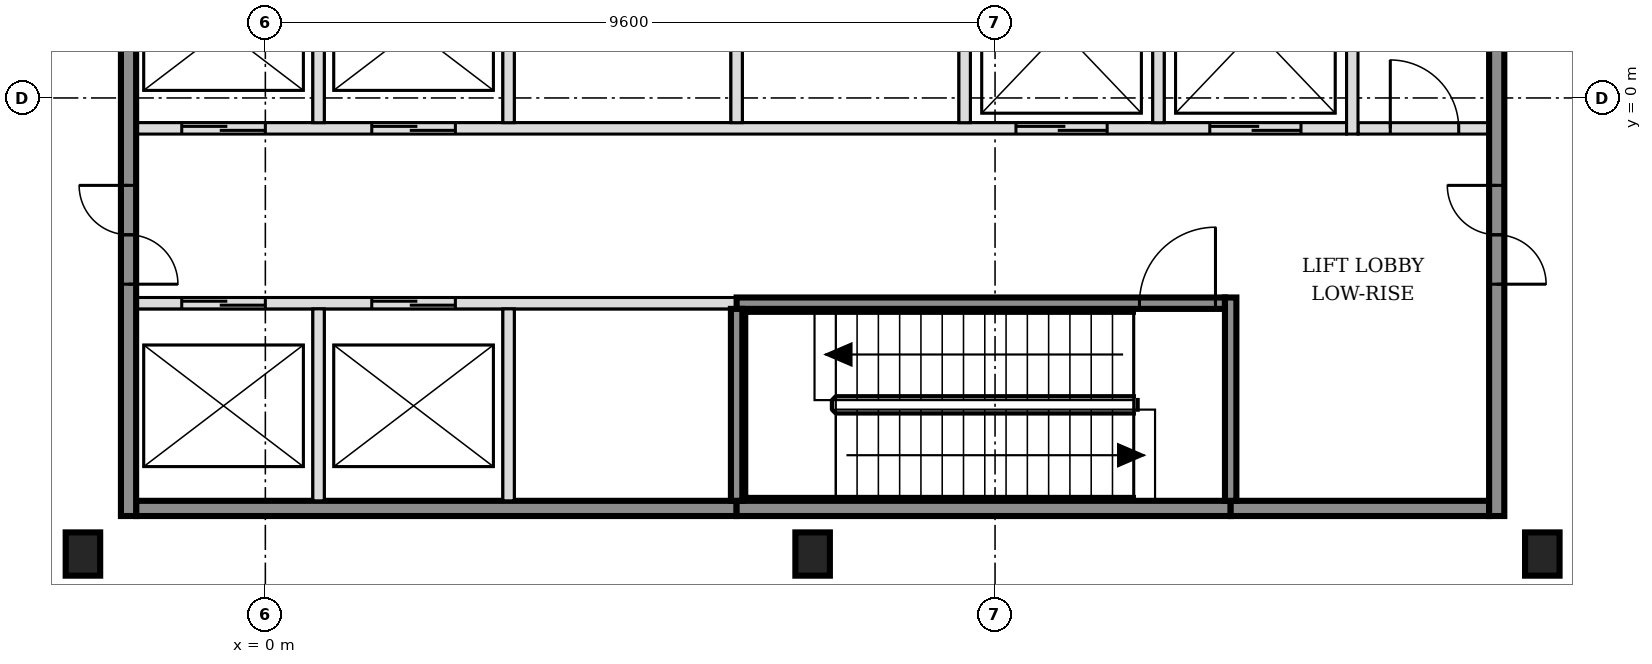
"""IFC4 building model, lengths in metres.
Left out: names, types, materials, properties, quantities, classifications, styles, units other than length and angle.
Written with IfcOpenShell. Run it as: python <this file> out.ifc"""

import sys

from ifc_helpers import new_model, si_unit, direction, frame, frame_2d, origin, origin_2d, place, context, subcontext, project, spatial, rectangle, i_section, extrude, element, fill, save


model = new_model("IFC4")
c1 = context("Model", 3, precision=1e-05, world=origin(), true_north=direction((0.0, 1.0)))
c2 = subcontext(c1, "Body", "Model", "MODEL_VIEW")
j1 = project(units=[si_unit("LENGTHUNIT", "METRE"), si_unit("PLANEANGLEUNIT", "RADIAN")], contexts=[c1])
p1 = place(None, origin())
s1 = spatial("IfcSite", under=j1, at=p1, CompositionType="ELEMENT")
p2 = place(p1, origin())
s2 = spatial("IfcBuilding", under=s1, at=p2, CompositionType="ELEMENT")
p3 = place(p2, frame((0.0, 0.0, 30.6)))
s3 = spatial("IfcBuildingStorey", under=s2, at=p3, CompositionType="ELEMENT", Elevation=30.6)
for number, where, z_axis, x_axis in (
    (1, (-2.4, -6.0, -0.2), (0.0, 0.0, 1.0), (1.0, 0.0, 0.0)),
    (2, (7.2, -6.0, -0.2), (0.0, 0.0, 1.0), (1.0, 0.0, 0.0)),
    (3, (16.8, -6.0, -0.2), (0.0, 0.0, 1.0), (1.0, 0.0, 0.0)),
):
    element("IfcColumn", number, at=place(p3, frame(where, z_axis=z_axis, x_axis=x_axis)), inside=s3, PredefinedType="COLUMN", context=c2, shape_type="SweptSolid", body=[
        extrude(i_section(OverallWidth=0.454, OverallDepth=0.569, WebThickness=0.078, FlangeThickness=0.125, FilletRadius=0.015, at=origin_2d()), origin(), (0.0, 0.0, 1.0), 4.8),
    ])
p4 = place(p3, frame((-1.7, -5.4, 0.0), z_axis=(0.0, 0.0, 1.0), x_axis=(1.0, 0.0, 0.0)))
e4 = element("IfcWall", 4, at=p4, inside=s3, PredefinedType="SOLIDWALL", context=c2, shape_type="SweptSolid", body=[
    extrude(rectangle(XDim=7.9, YDim=0.2, at=frame_2d((3.95, 0.0))), origin(), (0.0, 0.0, 1.0), 4.6),
])
p5 = place(p3, frame((6.2, -5.4, 0.0), z_axis=(0.0, 0.0, 1.0), x_axis=(1.0, 0.0, 0.0)))
e5 = element("IfcWall", 5, at=p5, inside=s3, PredefinedType="SOLIDWALL", context=c2, shape_type="SweptSolid", body=[
    extrude(rectangle(XDim=6.5, YDim=0.2, at=frame_2d((3.25, 0.0))), origin(), (0.0, 0.0, 1.0), 4.6),
])
p6 = place(p3, frame((12.7, -5.4, 0.0), z_axis=(0.0, 0.0, 1.0), x_axis=(1.0, 0.0, 0.0)))
e6 = element("IfcWall", 6, at=p6, inside=s3, PredefinedType="SOLIDWALL", context=c2, shape_type="SweptSolid", body=[
    extrude(rectangle(XDim=3.4, YDim=0.2, at=frame_2d((1.7, 0.0))), origin(), (0.0, 0.0, 1.0), 4.6),
])
p7 = place(p3, frame((-1.7, -2.7, 0.0), z_axis=(0.0, 0.0, 1.0), x_axis=(1.0, 0.0, 0.0)))
e7 = element("IfcWall", 7, at=p7, inside=s3, PredefinedType="SOLIDWALL", context=c2, shape_type="SweptSolid", body=[
    extrude(rectangle(XDim=7.9, YDim=0.15, at=frame_2d((3.95, 0.0))), origin(), (0.0, 0.0, 1.0), 4.6),
])
p8 = place(p7, frame((0.6, 0.0, 0.0)))
e8 = element("IfcOpeningElement", 8, at=p8, cuts=e7, PredefinedType="OPENING", context=c2, shape_type="SweptSolid", body=[
    extrude(rectangle(XDim=1.1, YDim=2.1, at=frame_2d((0.55, 1.05))), frame((0.0, 0.085, 0.0), z_axis=(0.0, -1.0, 0.0), x_axis=(1.0, 0.0, 0.0)), (0.0, 0.0, 1.0), 0.17),
])
p9 = place(p7, frame((3.1, 0.0, 0.0)))
e9 = element("IfcOpeningElement", 9, at=p9, cuts=e7, PredefinedType="OPENING", context=c2, shape_type="SweptSolid", body=[
    extrude(rectangle(XDim=1.1, YDim=2.1, at=frame_2d((0.55, 1.05))), frame((0.0, 0.085, 0.0), z_axis=(0.0, -1.0, 0.0), x_axis=(1.0, 0.0, 0.0)), (0.0, 0.0, 1.0), 0.17),
])
p10 = place(p3, frame((6.2, -2.7, 0.0), z_axis=(0.0, 0.0, 1.0), x_axis=(1.0, 0.0, 0.0)))
e10 = element("IfcWall", 10, at=p10, inside=s3, PredefinedType="SOLIDWALL", context=c2, shape_type="SweptSolid", body=[
    extrude(rectangle(XDim=6.425, YDim=0.15, at=frame_2d((3.212, 0.0))), origin(), (0.0, 0.0, 1.0), 4.6),
])
p11 = place(p10, frame((5.3, 0.0, 0.0)))
e11 = element("IfcOpeningElement", 11, at=p11, cuts=e10, PredefinedType="OPENING", context=c2, shape_type="SweptSolid", body=[
    extrude(rectangle(XDim=1.0, YDim=2.1, at=frame_2d((0.5, 1.05))), frame((0.0, 0.085, 0.0), z_axis=(0.0, -1.0, 0.0), x_axis=(1.0, 0.0, 0.0)), (0.0, 0.0, 1.0), 0.17),
])
p12 = place(p3, frame((-1.7, -0.4, 0.0), z_axis=(0.0, 0.0, 1.0), x_axis=(1.0, 0.0, 0.0)))
e12 = element("IfcWall", 12, at=p12, inside=s3, PredefinedType="SOLIDWALL", context=c2, shape_type="SweptSolid", body=[
    extrude(rectangle(XDim=15.925, YDim=0.15, at=frame_2d((7.962, 0.0))), origin(), (0.0, 0.0, 1.0), 4.6),
])
p13 = place(p12, frame((0.6, 0.0, 0.0)))
e13 = element("IfcOpeningElement", 13, at=p13, cuts=e12, PredefinedType="OPENING", context=c2, shape_type="SweptSolid", body=[
    extrude(rectangle(XDim=1.1, YDim=2.1, at=frame_2d((0.55, 1.05))), frame((0.0, 0.085, 0.0), z_axis=(0.0, -1.0, 0.0), x_axis=(1.0, 0.0, 0.0)), (0.0, 0.0, 1.0), 0.17),
])
p14 = place(p12, frame((3.1, 0.0, 0.0)))
e14 = element("IfcOpeningElement", 14, at=p14, cuts=e12, PredefinedType="OPENING", context=c2, shape_type="SweptSolid", body=[
    extrude(rectangle(XDim=1.1, YDim=2.1, at=frame_2d((0.55, 1.05))), frame((0.0, 0.085, 0.0), z_axis=(0.0, -1.0, 0.0), x_axis=(1.0, 0.0, 0.0)), (0.0, 0.0, 1.0), 0.17),
])
p15 = place(p12, frame((11.575, 0.0, 0.0)))
e15 = element("IfcOpeningElement", 15, at=p15, cuts=e12, PredefinedType="OPENING", context=c2, shape_type="SweptSolid", body=[
    extrude(rectangle(XDim=1.2, YDim=2.1, at=frame_2d((0.6, 1.05))), frame((0.0, 0.085, 0.0), z_axis=(0.0, -1.0, 0.0), x_axis=(1.0, 0.0, 0.0)), (0.0, 0.0, 1.0), 0.17),
])
p16 = place(p12, frame((14.125, 0.0, 0.0)))
e16 = element("IfcOpeningElement", 16, at=p16, cuts=e12, PredefinedType="OPENING", context=c2, shape_type="SweptSolid", body=[
    extrude(rectangle(XDim=1.2, YDim=2.1, at=frame_2d((0.6, 1.05))), frame((0.0, 0.085, 0.0), z_axis=(0.0, -1.0, 0.0), x_axis=(1.0, 0.0, 0.0)), (0.0, 0.0, 1.0), 0.17),
])
p17 = place(p3, frame((14.375, -0.4, 0.0), z_axis=(0.0, 0.0, 1.0), x_axis=(1.0, 0.0, 0.0)))
e17 = element("IfcWall", 17, at=p17, inside=s3, PredefinedType="PARTITIONING", context=c2, shape_type="SweptSolid", body=[
    extrude(rectangle(XDim=1.725, YDim=0.15, at=frame_2d((0.863, 0.0))), origin(), (0.0, 0.0, 1.0), 4.6),
])
p18 = place(p17, frame((0.425, 0.0, 0.0)))
e18 = element("IfcOpeningElement", 18, at=p18, cuts=e17, PredefinedType="OPENING", context=c2, shape_type="SweptSolid", body=[
    extrude(rectangle(XDim=0.9, YDim=2.1, at=frame_2d((0.45, 1.05))), frame((0.0, 0.085, 0.0), z_axis=(0.0, -1.0, 0.0), x_axis=(1.0, 0.0, 0.0)), (0.0, 0.0, 1.0), 0.17),
])
p19 = place(p3, frame((-1.8, -5.5, 0.0), z_axis=(0.0, 0.0, 1.0), x_axis=(0.0, 1.0, 0.0)))
e19 = element("IfcWall", 19, at=p19, inside=s3, PredefinedType="SOLIDWALL", context=c2, shape_type="SweptSolid", body=[
    extrude(rectangle(XDim=15.8, YDim=0.2, at=frame_2d((7.9, 0.0))), origin(), (0.0, 0.0, 1.0), 4.6),
])
p20 = place(p19, frame((3.05, 0.0, 0.0)))
e20 = element("IfcOpeningElement", 20, at=p20, cuts=e19, PredefinedType="OPENING", context=c2, shape_type="SweptSolid", body=[
    extrude(rectangle(XDim=1.3, YDim=2.1, at=frame_2d((0.65, 1.05))), frame((0.0, 0.11, 0.0), z_axis=(0.0, -1.0, 0.0), x_axis=(1.0, 0.0, 0.0)), (0.0, 0.0, 1.0), 0.22),
])
p21 = place(p19, frame((11.45, 0.0, 0.0)))
e21 = element("IfcOpeningElement", 21, at=p21, cuts=e19, PredefinedType="OPENING", context=c2, shape_type="SweptSolid", body=[
    extrude(rectangle(XDim=1.3, YDim=2.1, at=frame_2d((0.65, 1.05))), frame((0.0, 0.11, 0.0), z_axis=(0.0, -1.0, 0.0), x_axis=(1.0, 0.0, 0.0)), (0.0, 0.0, 1.0), 0.22),
])
p22 = place(p3, frame((0.7, -5.3, 0.0), z_axis=(0.0, 0.0, 1.0), x_axis=(0.0, 1.0, 0.0)))
e22 = element("IfcWall", 22, at=p22, inside=s3, PredefinedType="SOLIDWALL", context=c2, shape_type="SweptSolid", body=[
    extrude(rectangle(XDim=2.525, YDim=0.15, at=frame_2d((1.263, 0.0))), origin(), (0.0, 0.0, 1.0), 4.6),
])
p23 = place(p3, frame((0.7, -0.325, 0.0), z_axis=(0.0, 0.0, 1.0), x_axis=(0.0, 1.0, 0.0)))
e23 = element("IfcWall", 23, at=p23, inside=s3, PredefinedType="SOLIDWALL", context=c2, shape_type="SweptSolid", body=[
    extrude(rectangle(XDim=2.45, YDim=0.15, at=frame_2d((1.225, 0.0))), origin(), (0.0, 0.0, 1.0), 4.6),
])
p24 = place(p3, frame((3.2, -5.3, 0.0), z_axis=(0.0, 0.0, 1.0), x_axis=(0.0, 1.0, 0.0)))
e24 = element("IfcWall", 24, at=p24, inside=s3, PredefinedType="SOLIDWALL", context=c2, shape_type="SweptSolid", body=[
    extrude(rectangle(XDim=2.525, YDim=0.15, at=frame_2d((1.263, 0.0))), origin(), (0.0, 0.0, 1.0), 4.6),
])
p25 = place(p3, frame((3.2, -0.325, 0.0), z_axis=(0.0, 0.0, 1.0), x_axis=(0.0, 1.0, 0.0)))
e25 = element("IfcWall", 25, at=p25, inside=s3, PredefinedType="SOLIDWALL", context=c2, shape_type="SweptSolid", body=[
    extrude(rectangle(XDim=2.45, YDim=0.15, at=frame_2d((1.225, 0.0))), origin(), (0.0, 0.0, 1.0), 4.6),
])
p26 = place(p3, frame((6.2, -5.3, 0.0), z_axis=(0.0, 0.0, 1.0), x_axis=(0.0, 1.0, 0.0)))
e26 = element("IfcWall", 26, at=p26, inside=s3, PredefinedType="SOLIDWALL", context=c2, shape_type="SweptSolid", body=[
    extrude(rectangle(XDim=2.525, YDim=0.15, at=frame_2d((1.263, 0.0))), origin(), (0.0, 0.0, 1.0), 4.6),
])
for number, where, z_axis, x_axis in (
    (27, (6.2, -0.325, 0.0), (0.0, 0.0, 1.0), (0.0, 1.0, 0.0)),
    (28, (9.2, -0.325, 0.0), (0.0, 0.0, 1.0), (0.0, 1.0, 0.0)),
    (29, (11.75, -0.325, 0.0), (0.0, 0.0, 1.0), (0.0, 1.0, 0.0)),
):
    element("IfcWall", number, at=place(p3, frame(where, z_axis=z_axis, x_axis=x_axis)), inside=s3, PredefinedType="SOLIDWALL", context=c2, shape_type="SweptSolid", body=[
        extrude(rectangle(XDim=2.45, YDim=0.15, at=frame_2d((1.225, 0.0))), origin(), (0.0, 0.0, 1.0), 4.6),
    ])
p27 = place(p3, frame((12.7, -5.3, 0.0), z_axis=(0.0, 0.0, 1.0), x_axis=(0.0, 1.0, 0.0)))
e30 = element("IfcWall", 30, at=p27, inside=s3, PredefinedType="SOLIDWALL", context=c2, shape_type="SweptSolid", body=[
    extrude(rectangle(XDim=2.675, YDim=0.15, at=frame_2d((1.337, 0.0))), origin(), (0.0, 0.0, 1.0), 4.6),
])
p28 = place(p3, frame((14.3, -0.475, 0.0), z_axis=(0.0, 0.0, 1.0), x_axis=(0.0, 1.0, 0.0)))
e31 = element("IfcWall", 31, at=p28, inside=s3, PredefinedType="SOLIDWALL", context=c2, shape_type="SweptSolid", body=[
    extrude(rectangle(XDim=2.75, YDim=0.15, at=frame_2d((1.375, 0.0))), origin(), (0.0, 0.0, 1.0), 4.6),
])
p29 = place(p3, frame((16.2, -5.5, 0.0), z_axis=(0.0, 0.0, 1.0), x_axis=(0.0, 1.0, 0.0)))
e32 = element("IfcWall", 32, at=p29, inside=s3, PredefinedType="SOLIDWALL", context=c2, shape_type="SweptSolid", body=[
    extrude(rectangle(XDim=15.8, YDim=0.2, at=frame_2d((7.9, 0.0))), origin(), (0.0, 0.0, 1.0), 4.6),
])
p30 = place(p29, frame((3.05, 0.0, 0.0)))
e33 = element("IfcOpeningElement", 33, at=p30, cuts=e32, PredefinedType="OPENING", context=c2, shape_type="SweptSolid", body=[
    extrude(rectangle(XDim=1.3, YDim=2.1, at=frame_2d((0.65, 1.05))), frame((0.0, 0.11, 0.0), z_axis=(0.0, -1.0, 0.0), x_axis=(1.0, 0.0, 0.0)), (0.0, 0.0, 1.0), 0.22),
])
p31 = place(p29, frame((11.45, 0.0, 0.0)))
e34 = element("IfcOpeningElement", 34, at=p31, cuts=e32, PredefinedType="OPENING", context=c2, shape_type="SweptSolid", body=[
    extrude(rectangle(XDim=1.3, YDim=2.1, at=frame_2d((0.65, 1.05))), frame((0.0, 0.11, 0.0), z_axis=(0.0, -1.0, 0.0), x_axis=(1.0, 0.0, 0.0)), (0.0, 0.0, 1.0), 0.22),
])
p32 = place(p8, origin())
e35 = element("IfcDoor", 35, at=p32, inside=s3, OperationType="DOUBLE_DOOR_SLIDING", PredefinedType="DOOR", context=c2, shape_type="SweptSolid", body=[
    extrude(rectangle(XDim=1.1, YDim=2.1, at=frame_2d((0.55, 1.05))), frame((0.0, 0.025, 0.0), z_axis=(0.0, -1.0, 0.0), x_axis=(1.0, 0.0, 0.0)), (0.0, 0.0, 1.0), 0.05),
])
fill(e8, e35)
p33 = place(p9, origin())
e36 = element("IfcDoor", 36, at=p33, inside=s3, OperationType="DOUBLE_DOOR_SLIDING", PredefinedType="DOOR", context=c2, shape_type="SweptSolid", body=[
    extrude(rectangle(XDim=1.1, YDim=2.1, at=frame_2d((0.55, 1.05))), frame((0.0, 0.025, 0.0), z_axis=(0.0, -1.0, 0.0), x_axis=(1.0, 0.0, 0.0)), (0.0, 0.0, 1.0), 0.05),
])
fill(e9, e36)
p34 = place(p13, origin())
e37 = element("IfcDoor", 37, at=p34, inside=s3, OperationType="DOUBLE_DOOR_SLIDING", PredefinedType="DOOR", context=c2, shape_type="SweptSolid", body=[
    extrude(rectangle(XDim=1.1, YDim=2.1, at=frame_2d((0.55, 1.05))), frame((0.0, 0.025, 0.0), z_axis=(0.0, -1.0, 0.0), x_axis=(1.0, 0.0, 0.0)), (0.0, 0.0, 1.0), 0.05),
])
fill(e13, e37)
p35 = place(p14, origin())
e38 = element("IfcDoor", 38, at=p35, inside=s3, OperationType="DOUBLE_DOOR_SLIDING", PredefinedType="DOOR", context=c2, shape_type="SweptSolid", body=[
    extrude(rectangle(XDim=1.1, YDim=2.1, at=frame_2d((0.55, 1.05))), frame((0.0, 0.025, 0.0), z_axis=(0.0, -1.0, 0.0), x_axis=(1.0, 0.0, 0.0)), (0.0, 0.0, 1.0), 0.05),
])
fill(e14, e38)
p36 = place(p15, origin())
e39 = element("IfcDoor", 39, at=p36, inside=s3, OperationType="DOUBLE_DOOR_SLIDING", PredefinedType="DOOR", context=c2, shape_type="SweptSolid", body=[
    extrude(rectangle(XDim=1.2, YDim=2.1, at=frame_2d((0.6, 1.05))), frame((0.0, 0.025, 0.0), z_axis=(0.0, -1.0, 0.0), x_axis=(1.0, 0.0, 0.0)), (0.0, 0.0, 1.0), 0.05),
])
fill(e15, e39)
p37 = place(p16, origin())
e40 = element("IfcDoor", 40, at=p37, inside=s3, OperationType="DOUBLE_DOOR_SLIDING", PredefinedType="DOOR", context=c2, shape_type="SweptSolid", body=[
    extrude(rectangle(XDim=1.2, YDim=2.1, at=frame_2d((0.6, 1.05))), frame((0.0, 0.025, 0.0), z_axis=(0.0, -1.0, 0.0), x_axis=(1.0, 0.0, 0.0)), (0.0, 0.0, 1.0), 0.05),
])
fill(e16, e40)
p38 = place(p11, origin())
e41 = element("IfcDoor", 41, at=p38, inside=s3, OperationType="SINGLE_SWING_RIGHT", PredefinedType="DOOR", context=c2, shape_type="SweptSolid", body=[
    extrude(rectangle(XDim=1.0, YDim=2.1, at=frame_2d((0.5, 1.05))), frame((0.0, 0.025, 0.0), z_axis=(0.0, -1.0, 0.0), x_axis=(1.0, 0.0, 0.0)), (0.0, 0.0, 1.0), 0.05),
])
fill(e11, e41)
p39 = place(p20, origin())
e42 = element("IfcDoor", 42, at=p39, inside=s3, OperationType="DOUBLE_DOOR_SINGLE_SWING", PredefinedType="DOOR", context=c2, shape_type="SweptSolid", body=[
    extrude(rectangle(XDim=1.3, YDim=2.1, at=frame_2d((0.65, 1.05))), frame((0.0, 0.025, 0.0), z_axis=(0.0, -1.0, 0.0), x_axis=(1.0, 0.0, 0.0)), (0.0, 0.0, 1.0), 0.05),
])
fill(e20, e42)
p40 = place(p30, origin())
e43 = element("IfcDoor", 43, at=p40, inside=s3, OperationType="DOUBLE_DOOR_SINGLE_SWING", PredefinedType="DOOR", context=c2, shape_type="SweptSolid", body=[
    extrude(rectangle(XDim=1.3, YDim=2.1, at=frame_2d((0.65, 1.05))), frame((0.0, 0.025, 0.0), z_axis=(0.0, -1.0, 0.0), x_axis=(1.0, 0.0, 0.0)), (0.0, 0.0, 1.0), 0.05),
])
fill(e33, e43)
p41 = place(p18, origin())
e44 = element("IfcDoor", 44, at=p41, inside=s3, OperationType="SINGLE_SWING_LEFT", PredefinedType="DOOR", context=c2, shape_type="SweptSolid", body=[
    extrude(rectangle(XDim=0.9, YDim=2.1, at=frame_2d((0.45, 1.05))), frame((0.0, 0.025, 0.0), z_axis=(0.0, -1.0, 0.0), x_axis=(1.0, 0.0, 0.0)), (0.0, 0.0, 1.0), 0.05),
])
fill(e18, e44)
save(model, sys.argv[1])
